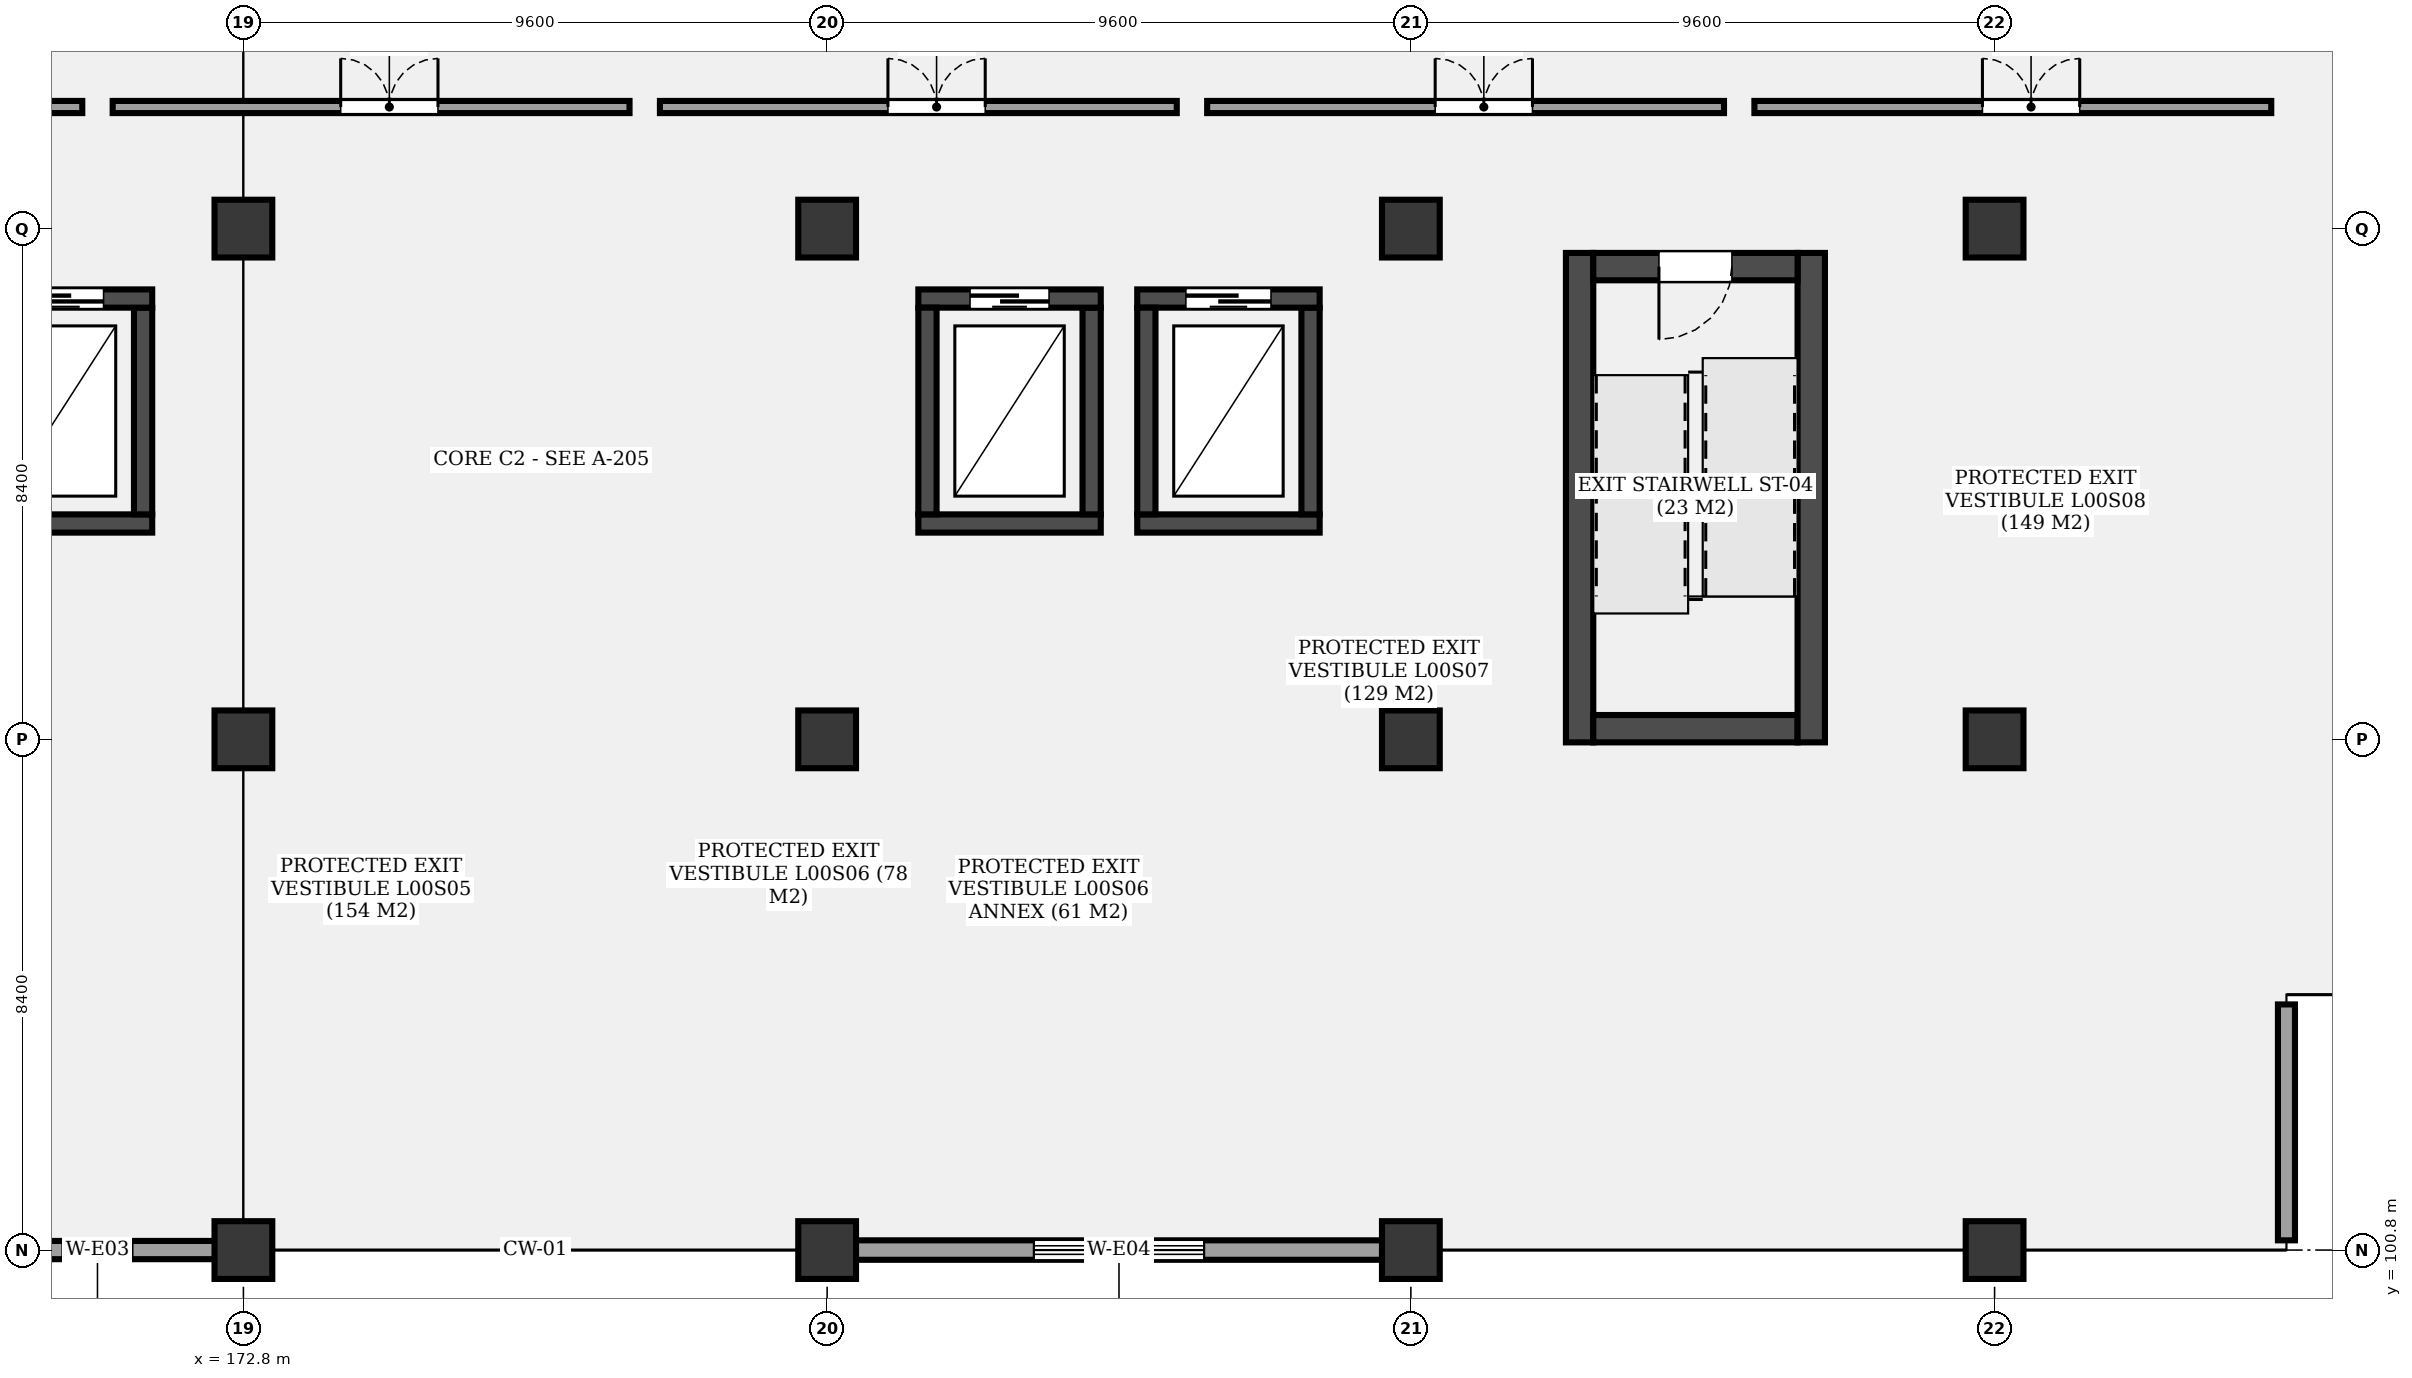
"""IFC4 building model, lengths in metres.
Left out: names, types, materials, properties, quantities, classifications, styles, units other than length and angle.
Written with IfcOpenShell. Run it as: python <this file> out.ifc"""

import sys

from ifc_helpers import new_model, si_unit, direction, frame, frame_2d, origin, origin_2d, place, context, subcontext, project, spatial, rectangle, extrude, element, fill, save


model = new_model("IFC4")
c1 = context("Model", 3, precision=1e-05, world=origin(), true_north=direction((0.0, 1.0)))
c2 = subcontext(c1, "Body", "Model", "MODEL_VIEW")
j1 = project(units=[si_unit("LENGTHUNIT", "METRE"), si_unit("PLANEANGLEUNIT", "RADIAN")], contexts=[c1])
p1 = place(None, origin())
s1 = spatial("IfcSite", under=j1, at=p1, CompositionType="ELEMENT")
p2 = place(p1, origin())
s2 = spatial("IfcBuilding", under=s1, at=p2, CompositionType="ELEMENT")
p3 = place(p2, origin())
s3 = spatial("IfcBuildingStorey", under=s2, at=p3, CompositionType="ELEMENT", Elevation=0.0)
for number, where, z_axis, x_axis in (
    (1, (172.8, 100.8, -0.35), (0.0, 0.0, 1.0), (1.0, 0.0, 0.0)),
    (2, (172.8, 109.2, -0.35), (0.0, 0.0, 1.0), (1.0, 0.0, 0.0)),
    (3, (172.8, 117.6, -0.35), (0.0, 0.0, 1.0), (1.0, 0.0, 0.0)),
    (4, (182.4, 100.8, -0.35), (0.0, 0.0, 1.0), (1.0, 0.0, 0.0)),
    (5, (182.4, 109.2, -0.35), (0.0, 0.0, 1.0), (1.0, 0.0, 0.0)),
    (6, (182.4, 117.6, -0.35), (0.0, 0.0, 1.0), (1.0, 0.0, 0.0)),
    (7, (192.0, 100.8, -0.35), (0.0, 0.0, 1.0), (1.0, 0.0, 0.0)),
    (8, (192.0, 109.2, -0.35), (0.0, 0.0, 1.0), (1.0, 0.0, 0.0)),
    (9, (192.0, 117.6, -0.35), (0.0, 0.0, 1.0), (1.0, 0.0, 0.0)),
    (10, (201.6, 100.8, -0.35), (0.0, 0.0, 1.0), (1.0, 0.0, 0.0)),
    (11, (201.6, 109.2, -0.35), (0.0, 0.0, 1.0), (1.0, 0.0, 0.0)),
    (12, (201.6, 117.6, -0.35), (0.0, 0.0, 1.0), (1.0, 0.0, 0.0)),
):
    element("IfcColumn", number, at=place(p3, frame(where, z_axis=z_axis, x_axis=x_axis)), inside=s3, PredefinedType="COLUMN", context=c2, shape_type="SweptSolid", body=[
        extrude(rectangle(XDim=0.95, YDim=0.95, at=origin_2d()), origin(), (0.0, 0.0, 1.0), 5.45),
    ])
p4 = place(p3, frame((194.775, 117.2, 0.0), z_axis=(0.0, 0.0, 1.0), x_axis=(0.0, -1.0, 0.0)))
e13 = element("IfcWall", 13, at=p4, inside=s3, PredefinedType="SHEAR", context=c2, shape_type="SweptSolid", body=[
    extrude(rectangle(XDim=8.05, YDim=0.45, at=frame_2d((4.025, 0.0))), origin(), (0.0, 0.0, 1.0), 5.1),
])
p5 = place(p3, frame((195.0, 109.375, 0.0), z_axis=(0.0, 0.0, 1.0), x_axis=(1.0, 0.0, 0.0)))
e14 = element("IfcWall", 14, at=p5, inside=s3, PredefinedType="SHEAR", context=c2, shape_type="SweptSolid", body=[
    extrude(rectangle(XDim=3.36, YDim=0.45, at=frame_2d((1.68, 0.0))), origin(), (0.0, 0.0, 1.0), 5.1),
])
p6 = place(p3, frame((198.585, 109.15, 0.0), z_axis=(0.0, 0.0, 1.0), x_axis=(0.0, 1.0, 0.0)))
e15 = element("IfcWall", 15, at=p6, inside=s3, PredefinedType="SHEAR", context=c2, shape_type="SweptSolid", body=[
    extrude(rectangle(XDim=8.05, YDim=0.45, at=frame_2d((4.025, 0.0))), origin(), (0.0, 0.0, 1.0), 5.1),
])
p7 = place(p3, frame((198.36, 116.975, 0.0), z_axis=(0.0, 0.0, 1.0), x_axis=(-1.0, 0.0, 0.0)))
e16 = element("IfcWall", 16, at=p7, inside=s3, PredefinedType="SHEAR", context=c2, shape_type="SweptSolid", body=[
    extrude(rectangle(XDim=3.36, YDim=0.45, at=frame_2d((1.68, 0.0))), origin(), (0.0, 0.0, 1.0), 5.1),
])
p8 = place(p7, frame((1.08, 0.0, 0.0)))
e17 = element("IfcOpeningElement", 17, at=p8, cuts=e16, PredefinedType="OPENING", context=c2, shape_type="SweptSolid", body=[
    extrude(rectangle(XDim=1.2, YDim=2.2, at=frame_2d((0.6, 1.1))), frame((0.0, 0.235, 0.0), z_axis=(0.0, -1.0, 0.0), x_axis=(1.0, 0.0, 0.0)), (0.0, 0.0, 1.0), 0.47),
])
p9 = place(p3, frame((168.3, 112.75, 0.0), z_axis=(0.0, 0.0, 1.0), x_axis=(1.0, 0.0, 0.0)))
e18 = element("IfcWall", 18, at=p9, inside=s3, PredefinedType="SHEAR", context=c2, shape_type="SweptSolid", body=[
    extrude(rectangle(XDim=3.0, YDim=0.3, at=frame_2d((1.5, 0.0))), origin(), (0.0, 0.0, 1.0), 5.1),
])
p10 = place(p3, frame((171.15, 112.9, 0.0), z_axis=(0.0, 0.0, 1.0), x_axis=(0.0, 1.0, 0.0)))
e19 = element("IfcWall", 19, at=p10, inside=s3, PredefinedType="SHEAR", context=c2, shape_type="SweptSolid", body=[
    extrude(rectangle(XDim=3.4, YDim=0.3, at=frame_2d((1.7, 0.0))), origin(), (0.0, 0.0, 1.0), 5.1),
])
p11 = place(p3, frame((171.3, 116.45, 0.0), z_axis=(0.0, 0.0, 1.0), x_axis=(-1.0, 0.0, 0.0)))
e20 = element("IfcWall", 20, at=p11, inside=s3, PredefinedType="SHEAR", context=c2, shape_type="SweptSolid", body=[
    extrude(rectangle(XDim=3.0, YDim=0.3, at=frame_2d((1.5, 0.0))), origin(), (0.0, 0.0, 1.0), 5.1),
])
p12 = place(p11, frame((0.8, 0.0, 0.0)))
e21 = element("IfcOpeningElement", 21, at=p12, cuts=e20, PredefinedType="OPENING", context=c2, shape_type="SweptSolid", body=[
    extrude(rectangle(XDim=1.4, YDim=2.3, at=frame_2d((0.7, 1.15))), frame((0.0, 0.16, 0.0), z_axis=(0.0, -1.0, 0.0), x_axis=(1.0, 0.0, 0.0)), (0.0, 0.0, 1.0), 0.32),
])
p13 = place(p3, frame((183.9, 112.75, 0.0), z_axis=(0.0, 0.0, 1.0), x_axis=(1.0, 0.0, 0.0)))
e22 = element("IfcWall", 22, at=p13, inside=s3, PredefinedType="SHEAR", context=c2, shape_type="SweptSolid", body=[
    extrude(rectangle(XDim=3.0, YDim=0.3, at=frame_2d((1.5, 0.0))), origin(), (0.0, 0.0, 1.0), 5.1),
])
p14 = place(p3, frame((186.75, 112.9, 0.0), z_axis=(0.0, 0.0, 1.0), x_axis=(0.0, 1.0, 0.0)))
e23 = element("IfcWall", 23, at=p14, inside=s3, PredefinedType="SHEAR", context=c2, shape_type="SweptSolid", body=[
    extrude(rectangle(XDim=3.4, YDim=0.3, at=frame_2d((1.7, 0.0))), origin(), (0.0, 0.0, 1.0), 5.1),
])
p15 = place(p3, frame((186.9, 116.45, 0.0), z_axis=(0.0, 0.0, 1.0), x_axis=(-1.0, 0.0, 0.0)))
e24 = element("IfcWall", 24, at=p15, inside=s3, PredefinedType="SHEAR", context=c2, shape_type="SweptSolid", body=[
    extrude(rectangle(XDim=3.0, YDim=0.3, at=frame_2d((1.5, 0.0))), origin(), (0.0, 0.0, 1.0), 5.1),
])
p16 = place(p15, frame((0.85, 0.0, 0.0)))
e25 = element("IfcOpeningElement", 25, at=p16, cuts=e24, PredefinedType="OPENING", context=c2, shape_type="SweptSolid", body=[
    extrude(rectangle(XDim=1.3, YDim=2.3, at=frame_2d((0.65, 1.15))), frame((0.0, 0.16, 0.0), z_axis=(0.0, -1.0, 0.0), x_axis=(1.0, 0.0, 0.0)), (0.0, 0.0, 1.0), 0.32),
])
p17 = place(p3, frame((184.05, 116.3, 0.0), z_axis=(0.0, 0.0, 1.0), x_axis=(0.0, -1.0, 0.0)))
e26 = element("IfcWall", 26, at=p17, inside=s3, PredefinedType="SHEAR", context=c2, shape_type="SweptSolid", body=[
    extrude(rectangle(XDim=3.4, YDim=0.3, at=frame_2d((1.7, 0.0))), origin(), (0.0, 0.0, 1.0), 5.1),
])
p18 = place(p3, frame((187.5, 112.75, 0.0), z_axis=(0.0, 0.0, 1.0), x_axis=(1.0, 0.0, 0.0)))
e27 = element("IfcWall", 27, at=p18, inside=s3, PredefinedType="SHEAR", context=c2, shape_type="SweptSolid", body=[
    extrude(rectangle(XDim=3.0, YDim=0.3, at=frame_2d((1.5, 0.0))), origin(), (0.0, 0.0, 1.0), 5.1),
])
p19 = place(p3, frame((190.35, 112.9, 0.0), z_axis=(0.0, 0.0, 1.0), x_axis=(0.0, 1.0, 0.0)))
e28 = element("IfcWall", 28, at=p19, inside=s3, PredefinedType="SHEAR", context=c2, shape_type="SweptSolid", body=[
    extrude(rectangle(XDim=3.4, YDim=0.3, at=frame_2d((1.7, 0.0))), origin(), (0.0, 0.0, 1.0), 5.1),
])
p20 = place(p3, frame((190.5, 116.45, 0.0), z_axis=(0.0, 0.0, 1.0), x_axis=(-1.0, 0.0, 0.0)))
e29 = element("IfcWall", 29, at=p20, inside=s3, PredefinedType="SHEAR", context=c2, shape_type="SweptSolid", body=[
    extrude(rectangle(XDim=3.0, YDim=0.3, at=frame_2d((1.5, 0.0))), origin(), (0.0, 0.0, 1.0), 5.1),
])
p21 = place(p20, frame((0.8, 0.0, 0.0)))
e30 = element("IfcOpeningElement", 30, at=p21, cuts=e29, PredefinedType="OPENING", context=c2, shape_type="SweptSolid", body=[
    extrude(rectangle(XDim=1.4, YDim=2.3, at=frame_2d((0.7, 1.15))), frame((0.0, 0.16, 0.0), z_axis=(0.0, -1.0, 0.0), x_axis=(1.0, 0.0, 0.0)), (0.0, 0.0, 1.0), 0.32),
])
p22 = place(p3, frame((187.65, 116.3, 0.0), z_axis=(0.0, 0.0, 1.0), x_axis=(0.0, -1.0, 0.0)))
e31 = element("IfcWall", 31, at=p22, inside=s3, PredefinedType="SHEAR", context=c2, shape_type="SweptSolid", body=[
    extrude(rectangle(XDim=3.4, YDim=0.3, at=frame_2d((1.7, 0.0))), origin(), (0.0, 0.0, 1.0), 5.1),
])
p23 = place(p3, frame((172.8, 100.8, 0.0), z_axis=(0.0, 0.0, 1.0), x_axis=(-1.0, 0.0, 0.0)))
e32 = element("IfcWall", 32, at=p23, inside=s3, PredefinedType="SOLIDWALL", context=c2, shape_type="SweptSolid", body=[
    extrude(rectangle(XDim=4.8, YDim=0.3, at=frame_2d((2.4, 0.0))), origin(), (0.0, 0.0, 1.0), 4.24),
])
p24 = place(p23, frame((1.825, 0.0, 0.85)))
e33 = element("IfcOpeningElement", 33, at=p24, cuts=e32, PredefinedType="OPENING", context=c2, shape_type="SweptSolid", body=[
    extrude(rectangle(XDim=1.15, YDim=1.2, at=frame_2d((0.575, 0.6))), frame((0.0, 0.16, 0.0), z_axis=(0.0, -1.0, 0.0), x_axis=(1.0, 0.0, 0.0)), (0.0, 0.0, 1.0), 0.32),
])
p25 = place(p3, frame((192.0, 100.8, 0.0), z_axis=(0.0, 0.0, 1.0), x_axis=(-1.0, 0.0, 0.0)))
e34 = element("IfcWall", 34, at=p25, inside=s3, PredefinedType="SOLIDWALL", context=c2, shape_type="SweptSolid", body=[
    extrude(rectangle(XDim=9.6, YDim=0.32, at=frame_2d((4.8, 0.0))), origin(), (0.0, 0.0, 1.0), 4.24),
])
p26 = place(p25, frame((3.4, 0.0, 0.85)))
e35 = element("IfcOpeningElement", 35, at=p26, cuts=e34, PredefinedType="OPENING", context=c2, shape_type="SweptSolid", body=[
    extrude(rectangle(XDim=2.8, YDim=1.4, at=frame_2d((1.4, 0.7))), frame((0.0, 0.17, 0.0), z_axis=(0.0, -1.0, 0.0), x_axis=(1.0, 0.0, 0.0)), (0.0, 0.0, 1.0), 0.34),
])
p27 = place(p3, frame((206.4, 104.84, 0.0), z_axis=(0.0, 0.0, 1.0), x_axis=(0.0, -1.0, 0.0)))
e36 = element("IfcWall", 36, at=p27, inside=s3, PredefinedType="SOLIDWALL", context=c2, shape_type="SweptSolid", body=[
    extrude(rectangle(XDim=3.88, YDim=0.28, at=frame_2d((1.94, 0.0))), origin(), (0.0, 0.0, 1.0), 4.24),
])
p28 = place(p3, frame((161.65, 119.6, 0.0), z_axis=(0.0, 0.0, 1.0), x_axis=(1.0, 0.0, 0.0)))
e37 = element("IfcWall", 37, at=p28, inside=s3, PredefinedType="PARTITIONING", context=c2, shape_type="SweptSolid", body=[
    extrude(rectangle(XDim=8.5, YDim=0.2, at=frame_2d((4.25, 0.0))), origin(), (0.0, 0.0, 1.0), 3.98),
])
p29 = place(p28, frame((3.75, 0.0, 0.0)))
e38 = element("IfcOpeningElement", 38, at=p29, cuts=e37, PredefinedType="OPENING", context=c2, shape_type="SweptSolid", body=[
    extrude(rectangle(XDim=1.6, YDim=2.2, at=frame_2d((0.8, 1.1))), frame((0.0, 0.11, 0.0), z_axis=(0.0, -1.0, 0.0), x_axis=(1.0, 0.0, 0.0)), (0.0, 0.0, 1.0), 0.22),
])
p30 = place(p3, frame((170.65, 119.6, 0.0), z_axis=(0.0, 0.0, 1.0), x_axis=(1.0, 0.0, 0.0)))
e39 = element("IfcWall", 39, at=p30, inside=s3, PredefinedType="PARTITIONING", context=c2, shape_type="SweptSolid", body=[
    extrude(rectangle(XDim=8.5, YDim=0.2, at=frame_2d((4.25, 0.0))), origin(), (0.0, 0.0, 1.0), 3.98),
])
p31 = place(p30, frame((3.75, 0.0, 0.0)))
e40 = element("IfcOpeningElement", 40, at=p31, cuts=e39, PredefinedType="OPENING", context=c2, shape_type="SweptSolid", body=[
    extrude(rectangle(XDim=1.6, YDim=2.2, at=frame_2d((0.8, 1.1))), frame((0.0, 0.11, 0.0), z_axis=(0.0, -1.0, 0.0), x_axis=(1.0, 0.0, 0.0)), (0.0, 0.0, 1.0), 0.22),
])
p32 = place(p3, frame((179.65, 119.6, 0.0), z_axis=(0.0, 0.0, 1.0), x_axis=(1.0, 0.0, 0.0)))
e41 = element("IfcWall", 41, at=p32, inside=s3, PredefinedType="PARTITIONING", context=c2, shape_type="SweptSolid", body=[
    extrude(rectangle(XDim=8.5, YDim=0.2, at=frame_2d((4.25, 0.0))), origin(), (0.0, 0.0, 1.0), 3.98),
])
p33 = place(p32, frame((3.75, 0.0, 0.0)))
e42 = element("IfcOpeningElement", 42, at=p33, cuts=e41, PredefinedType="OPENING", context=c2, shape_type="SweptSolid", body=[
    extrude(rectangle(XDim=1.6, YDim=2.2, at=frame_2d((0.8, 1.1))), frame((0.0, 0.11, 0.0), z_axis=(0.0, -1.0, 0.0), x_axis=(1.0, 0.0, 0.0)), (0.0, 0.0, 1.0), 0.22),
])
p34 = place(p3, frame((188.65, 119.6, 0.0), z_axis=(0.0, 0.0, 1.0), x_axis=(1.0, 0.0, 0.0)))
e43 = element("IfcWall", 43, at=p34, inside=s3, PredefinedType="PARTITIONING", context=c2, shape_type="SweptSolid", body=[
    extrude(rectangle(XDim=8.5, YDim=0.2, at=frame_2d((4.25, 0.0))), origin(), (0.0, 0.0, 1.0), 3.98),
])
p35 = place(p34, frame((3.75, 0.0, 0.0)))
e44 = element("IfcOpeningElement", 44, at=p35, cuts=e43, PredefinedType="OPENING", context=c2, shape_type="SweptSolid", body=[
    extrude(rectangle(XDim=1.6, YDim=2.2, at=frame_2d((0.8, 1.1))), frame((0.0, 0.11, 0.0), z_axis=(0.0, -1.0, 0.0), x_axis=(1.0, 0.0, 0.0)), (0.0, 0.0, 1.0), 0.22),
])
p36 = place(p3, frame((197.65, 119.6, 0.0), z_axis=(0.0, 0.0, 1.0), x_axis=(1.0, 0.0, 0.0)))
e45 = element("IfcWall", 45, at=p36, inside=s3, PredefinedType="PARTITIONING", context=c2, shape_type="SweptSolid", body=[
    extrude(rectangle(XDim=8.5, YDim=0.2, at=frame_2d((4.25, 0.0))), origin(), (0.0, 0.0, 1.0), 3.98),
])
p37 = place(p36, frame((3.75, 0.0, 0.0)))
e46 = element("IfcOpeningElement", 46, at=p37, cuts=e45, PredefinedType="OPENING", context=c2, shape_type="SweptSolid", body=[
    extrude(rectangle(XDim=1.6, YDim=2.2, at=frame_2d((0.8, 1.1))), frame((0.0, 0.11, 0.0), z_axis=(0.0, -1.0, 0.0), x_axis=(1.0, 0.0, 0.0)), (0.0, 0.0, 1.0), 0.22),
])
p38 = place(p8, origin())
e47 = element("IfcDoor", 47, at=p38, inside=s3, OperationType="SINGLE_SWING_RIGHT", PredefinedType="DOOR", context=c2, shape_type="SweptSolid", body=[
    extrude(rectangle(XDim=1.2, YDim=2.2, at=frame_2d((0.6, 1.1))), frame((0.0, 0.025, 0.0), z_axis=(0.0, -1.0, 0.0), x_axis=(1.0, 0.0, 0.0)), (0.0, 0.0, 1.0), 0.05),
])
fill(e17, e47)
p39 = place(p12, origin())
e48 = element("IfcDoor", 48, at=p39, inside=s3, OperationType="SLIDING_TO_RIGHT", PredefinedType="DOOR", context=c2, shape_type="SweptSolid", body=[
    extrude(rectangle(XDim=1.4, YDim=2.3, at=frame_2d((0.7, 1.15))), frame((0.0, 0.025, 0.0), z_axis=(0.0, -1.0, 0.0), x_axis=(1.0, 0.0, 0.0)), (0.0, 0.0, 1.0), 0.05),
])
fill(e21, e48)
p40 = place(p16, origin())
e49 = element("IfcDoor", 49, at=p40, inside=s3, OperationType="SLIDING_TO_LEFT", PredefinedType="DOOR", context=c2, shape_type="SweptSolid", body=[
    extrude(rectangle(XDim=1.3, YDim=2.3, at=frame_2d((0.65, 1.15))), frame((0.0, 0.025, 0.0), z_axis=(0.0, -1.0, 0.0), x_axis=(1.0, 0.0, 0.0)), (0.0, 0.0, 1.0), 0.05),
])
fill(e25, e49)
p41 = place(p21, origin())
e50 = element("IfcDoor", 50, at=p41, inside=s3, OperationType="SLIDING_TO_LEFT", PredefinedType="DOOR", context=c2, shape_type="SweptSolid", body=[
    extrude(rectangle(XDim=1.4, YDim=2.3, at=frame_2d((0.7, 1.15))), frame((0.0, 0.025, 0.0), z_axis=(0.0, -1.0, 0.0), x_axis=(1.0, 0.0, 0.0)), (0.0, 0.0, 1.0), 0.05),
])
fill(e30, e50)
p42 = place(p24, origin())
e51 = element("IfcWindow", 51, at=p42, inside=s3, PartitioningType="SINGLE_PANEL", PredefinedType="WINDOW", context=c2, shape_type="SweptSolid", body=[
    extrude(rectangle(XDim=1.15, YDim=1.2, at=frame_2d((0.575, 0.6))), frame((0.0, 0.03, 0.0), z_axis=(0.0, -1.0, 0.0), x_axis=(1.0, 0.0, 0.0)), (0.0, 0.0, 1.0), 0.06),
])
fill(e33, e51)
p43 = place(p26, origin())
e52 = element("IfcWindow", 52, at=p43, inside=s3, PartitioningType="SINGLE_PANEL", PredefinedType="WINDOW", context=c2, shape_type="SweptSolid", body=[
    extrude(rectangle(XDim=2.8, YDim=1.4, at=frame_2d((1.4, 0.7))), frame((0.0, 0.03, 0.0), z_axis=(0.0, -1.0, 0.0), x_axis=(1.0, 0.0, 0.0)), (0.0, 0.0, 1.0), 0.06),
])
fill(e35, e52)
p44 = place(p31, origin())
e53 = element("IfcDoor", 53, at=p44, inside=s3, OperationType="DOUBLE_DOOR_SINGLE_SWING", PredefinedType="DOOR", context=c2, shape_type="SweptSolid", body=[
    extrude(rectangle(XDim=1.6, YDim=2.2, at=frame_2d((0.8, 1.1))), frame((0.0, 0.025, 0.0), z_axis=(0.0, -1.0, 0.0), x_axis=(1.0, 0.0, 0.0)), (0.0, 0.0, 1.0), 0.05),
])
fill(e40, e53)
p45 = place(p33, origin())
e54 = element("IfcDoor", 54, at=p45, inside=s3, OperationType="DOUBLE_DOOR_SINGLE_SWING", PredefinedType="DOOR", context=c2, shape_type="SweptSolid", body=[
    extrude(rectangle(XDim=1.6, YDim=2.2, at=frame_2d((0.8, 1.1))), frame((0.0, 0.025, 0.0), z_axis=(0.0, -1.0, 0.0), x_axis=(1.0, 0.0, 0.0)), (0.0, 0.0, 1.0), 0.05),
])
fill(e42, e54)
p46 = place(p35, origin())
e55 = element("IfcDoor", 55, at=p46, inside=s3, OperationType="DOUBLE_DOOR_SINGLE_SWING", PredefinedType="DOOR", context=c2, shape_type="SweptSolid", body=[
    extrude(rectangle(XDim=1.6, YDim=2.2, at=frame_2d((0.8, 1.1))), frame((0.0, 0.025, 0.0), z_axis=(0.0, -1.0, 0.0), x_axis=(1.0, 0.0, 0.0)), (0.0, 0.0, 1.0), 0.05),
])
fill(e44, e55)
p47 = place(p37, origin())
e56 = element("IfcDoor", 56, at=p47, inside=s3, OperationType="DOUBLE_DOOR_SINGLE_SWING", PredefinedType="DOOR", context=c2, shape_type="SweptSolid", body=[
    extrude(rectangle(XDim=1.6, YDim=2.2, at=frame_2d((0.8, 1.1))), frame((0.0, 0.025, 0.0), z_axis=(0.0, -1.0, 0.0), x_axis=(1.0, 0.0, 0.0)), (0.0, 0.0, 1.0), 0.05),
])
fill(e46, e56)
save(model, sys.argv[1])
